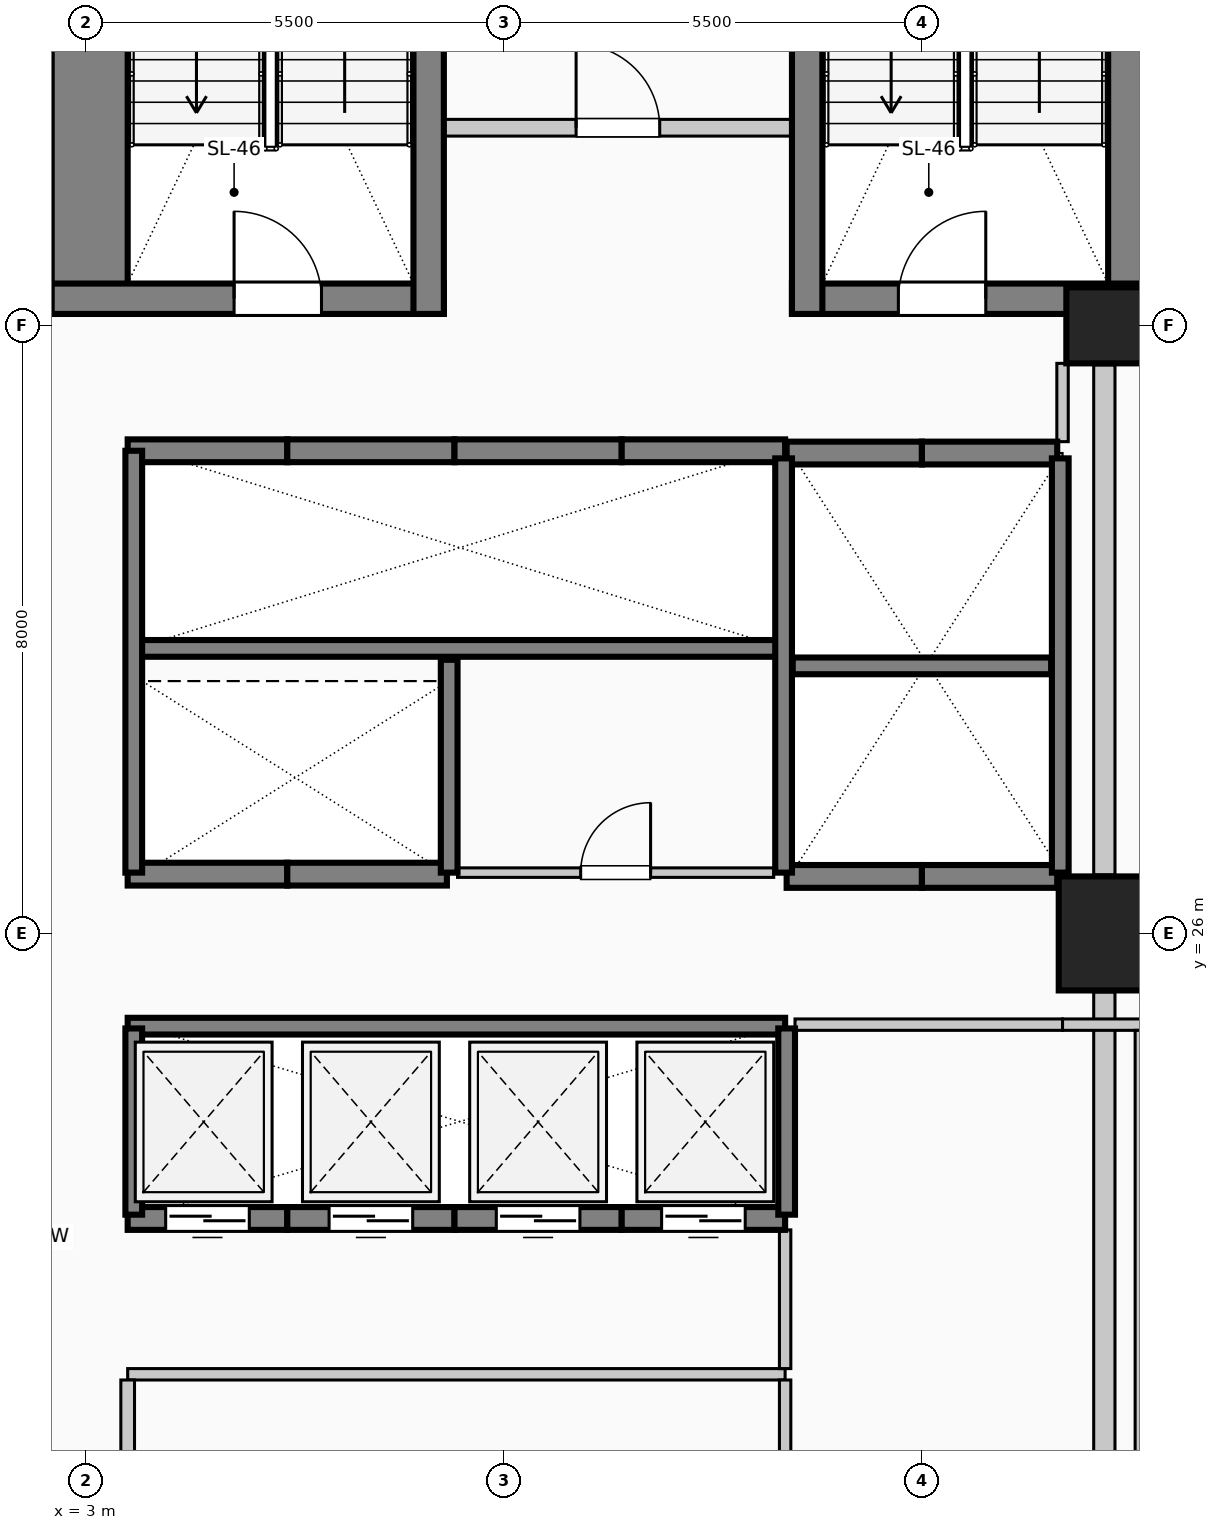
"""IFC4 building model, lengths in metres.
Left out: names, types, materials, properties, quantities, classifications, styles, units other than length and angle.
Written with IfcOpenShell. Run it as: python <this file> out.ifc"""

import sys

from ifc_helpers import new_model, si_unit, direction, frame, frame_2d, origin, origin_2d, place, context, subcontext, project, spatial, rectangle, circle, extrude, element, fill, save


model = new_model("IFC4")
c1 = context("Model", 3, precision=1e-05, world=origin(), true_north=direction((0.0, 1.0)))
c2 = subcontext(c1, "Body", "Model", "MODEL_VIEW")
j1 = project(units=[si_unit("LENGTHUNIT", "METRE"), si_unit("PLANEANGLEUNIT", "RADIAN")], contexts=[c1])
p1 = place(None, origin())
s1 = spatial("IfcSite", under=j1, at=p1, CompositionType="ELEMENT")
p2 = place(p1, origin())
s2 = spatial("IfcBuilding", under=s1, at=p2, CompositionType="ELEMENT")
p3 = place(p2, frame((0.0, 0.0, 26.6)))
s3 = spatial("IfcBuildingStorey", under=s2, at=p3, CompositionType="ELEMENT", Elevation=26.6)
for number, where, z_axis, x_axis in (
    (1, (3.05, 34.15, 0.0), (0.0, 0.0, 1.0), (0.0, 1.0, 0.0)),
    (2, (16.95, 34.15, 0.0), (0.0, 0.0, 1.0), (0.0, 1.0, 0.0)),
):
    element("IfcWall", number, at=place(p3, frame(where, z_axis=z_axis, x_axis=x_axis)), inside=s3, PredefinedType="SHEAR", context=c2, shape_type="SweptSolid", body=[
        extrude(rectangle(XDim=9.28, YDim=1.0, at=frame_2d((4.64, 0.0))), origin(), (0.0, 0.0, 1.0), 4.0),
    ])
p4 = place(p3, frame((2.55, 34.35, 0.0), z_axis=(0.0, 0.0, 1.0), x_axis=(1.0, 0.0, 0.0)))
e3 = element("IfcWall", 3, at=p4, inside=s3, PredefinedType="SHEAR", context=c2, shape_type="SweptSolid", body=[
    extrude(rectangle(XDim=5.16, YDim=0.4, at=frame_2d((2.58, 0.0))), origin(), (0.0, 0.0, 1.0), 4.0),
])
p5 = place(p4, frame((2.4, 0.0, 0.0)))
e4 = element("IfcOpeningElement", 4, at=p5, cuts=e3, PredefinedType="OPENING", context=c2, shape_type="SweptSolid", body=[
    extrude(rectangle(XDim=1.15, YDim=2.2, at=frame_2d((0.575, 1.1))), frame((0.0, 0.21, 0.0), z_axis=(0.0, -1.0, 0.0), x_axis=(1.0, 0.0, 0.0)), (0.0, 0.0, 1.0), 0.42),
])
p6 = place(p3, frame((12.29, 34.35, 0.0), z_axis=(0.0, 0.0, 1.0), x_axis=(1.0, 0.0, 0.0)))
e5 = element("IfcWall", 5, at=p6, inside=s3, PredefinedType="SHEAR", context=c2, shape_type="SweptSolid", body=[
    extrude(rectangle(XDim=5.16, YDim=0.4, at=frame_2d((2.58, 0.0))), origin(), (0.0, 0.0, 1.0), 4.0),
])
p7 = place(p6, frame((1.4, 0.0, 0.0)))
e6 = element("IfcOpeningElement", 6, at=p7, cuts=e5, PredefinedType="OPENING", context=c2, shape_type="SweptSolid", body=[
    extrude(rectangle(XDim=1.15, YDim=2.2, at=frame_2d((0.575, 1.1))), frame((0.0, 0.21, 0.0), z_axis=(0.0, -1.0, 0.0), x_axis=(1.0, 0.0, 0.0)), (0.0, 0.0, 1.0), 0.42),
])
for number, where, z_axis, x_axis in (
    (7, (7.51, 34.15, 0.0), (0.0, 0.0, 1.0), (0.0, 1.0, 0.0)),
    (8, (12.49, 34.15, 0.0), (0.0, 0.0, 1.0), (0.0, 1.0, 0.0)),
):
    element("IfcWall", number, at=place(p3, frame(where, z_axis=z_axis, x_axis=x_axis)), inside=s3, PredefinedType="SHEAR", context=c2, shape_type="SweptSolid", body=[
        extrude(rectangle(XDim=9.28, YDim=0.4, at=frame_2d((4.64, 0.0))), origin(), (0.0, 0.0, 1.0), 4.0),
    ])
p8 = place(p3, frame((16.4, 26.0, 0.0), z_axis=(0.0, 0.0, 1.0), x_axis=(1.0, 0.0, 0.0)))
e9 = element("IfcColumn", 9, at=p8, inside=s3, PredefinedType="COLUMN", context=c2, shape_type="SweptSolid", body=[
    extrude(rectangle(XDim=1.2, YDim=1.5, at=origin_2d()), origin(), (0.0, 0.0, 1.0), 4.0),
])
p9 = place(p3, frame((16.4, 34.0, 0.0), z_axis=(0.0, 0.0, 1.0), x_axis=(1.0, 0.0, 0.0)))
e10 = element("IfcColumn", 10, at=p9, inside=s3, PredefinedType="COLUMN", context=c2, shape_type="SweptSolid", body=[
    extrude(circle(Radius=0.5, at=origin_2d()), origin(), (0.0, 0.0, 1.0), 4.0),
])
p10 = place(p3, frame((16.4, 25.23, 0.0), z_axis=(0.0, 0.0, 1.0), x_axis=(0.0, -1.0, 0.0)))
e11 = element("IfcWall", 11, at=p10, inside=s3, PredefinedType="SOLIDWALL", context=c2, shape_type="SweptSolid", body=[
    extrude(rectangle(XDim=6.46, YDim=0.28, at=frame_2d((3.23, 0.0))), origin(), (0.0, 0.0, 1.0), 3.0),
])
p11 = place(p3, frame((16.4, 33.48, 0.0), z_axis=(0.0, 0.0, 1.0), x_axis=(0.0, -1.0, 0.0)))
e12 = element("IfcWall", 12, at=p11, inside=s3, PredefinedType="SOLIDWALL", context=c2, shape_type="SweptSolid", body=[
    extrude(rectangle(XDim=6.71, YDim=0.28, at=frame_2d((3.355, 0.0))), origin(), (0.0, 0.0, 1.0), 3.0),
])
p12 = place(p3, frame((5.65, 22.25, 0.0), z_axis=(0.0, 0.0, 1.0), x_axis=(-1.0, 0.0, 0.0)))
e13 = element("IfcWall", 13, at=p12, inside=s3, PredefinedType="SOLIDWALL", context=c2, shape_type="SweptSolid", body=[
    extrude(rectangle(XDim=2.1, YDim=0.3, at=frame_2d((1.05, 0.0))), origin(), (0.0, 0.0, 1.0), 4.0),
])
p13 = place(p12, frame((0.5, 0.0, 0.0)))
e14 = element("IfcOpeningElement", 14, at=p13, cuts=e13, PredefinedType="OPENING", context=c2, shape_type="SweptSolid", body=[
    extrude(rectangle(XDim=1.1, YDim=2.2, at=frame_2d((0.55, 1.1))), frame((0.0, 0.16, 0.0), z_axis=(0.0, -1.0, 0.0), x_axis=(1.0, 0.0, 0.0)), (0.0, 0.0, 1.0), 0.32),
])
p14 = place(p3, frame((7.85, 22.25, 0.0), z_axis=(0.0, 0.0, 1.0), x_axis=(-1.0, 0.0, 0.0)))
e15 = element("IfcWall", 15, at=p14, inside=s3, PredefinedType="SOLIDWALL", context=c2, shape_type="SweptSolid", body=[
    extrude(rectangle(XDim=2.2, YDim=0.3, at=frame_2d((1.1, 0.0))), origin(), (0.0, 0.0, 1.0), 4.0),
])
p15 = place(p14, frame((0.55, 0.0, 0.0)))
e16 = element("IfcOpeningElement", 16, at=p15, cuts=e15, PredefinedType="OPENING", context=c2, shape_type="SweptSolid", body=[
    extrude(rectangle(XDim=1.1, YDim=2.2, at=frame_2d((0.55, 1.1))), frame((0.0, 0.16, 0.0), z_axis=(0.0, -1.0, 0.0), x_axis=(1.0, 0.0, 0.0)), (0.0, 0.0, 1.0), 0.32),
])
p16 = place(p3, frame((10.05, 22.25, 0.0), z_axis=(0.0, 0.0, 1.0), x_axis=(-1.0, 0.0, 0.0)))
e17 = element("IfcWall", 17, at=p16, inside=s3, PredefinedType="SOLIDWALL", context=c2, shape_type="SweptSolid", body=[
    extrude(rectangle(XDim=2.2, YDim=0.3, at=frame_2d((1.1, 0.0))), origin(), (0.0, 0.0, 1.0), 4.0),
])
p17 = place(p16, frame((0.55, 0.0, 0.0)))
e18 = element("IfcOpeningElement", 18, at=p17, cuts=e17, PredefinedType="OPENING", context=c2, shape_type="SweptSolid", body=[
    extrude(rectangle(XDim=1.1, YDim=2.2, at=frame_2d((0.55, 1.1))), frame((0.0, 0.16, 0.0), z_axis=(0.0, -1.0, 0.0), x_axis=(1.0, 0.0, 0.0)), (0.0, 0.0, 1.0), 0.32),
])
p18 = place(p3, frame((12.2, 22.25, 0.0), z_axis=(0.0, 0.0, 1.0), x_axis=(-1.0, 0.0, 0.0)))
e19 = element("IfcWall", 19, at=p18, inside=s3, PredefinedType="SOLIDWALL", context=c2, shape_type="SweptSolid", body=[
    extrude(rectangle(XDim=2.15, YDim=0.3, at=frame_2d((1.075, 0.0))), origin(), (0.0, 0.0, 1.0), 4.0),
])
p19 = place(p18, frame((0.525, 0.0, 0.0)))
e20 = element("IfcOpeningElement", 20, at=p19, cuts=e19, PredefinedType="OPENING", context=c2, shape_type="SweptSolid", body=[
    extrude(rectangle(XDim=1.1, YDim=2.2, at=frame_2d((0.55, 1.1))), frame((0.0, 0.16, 0.0), z_axis=(0.0, -1.0, 0.0), x_axis=(1.0, 0.0, 0.0)), (0.0, 0.0, 1.0), 0.32),
])
for number, where, z_axis, x_axis in (
    (21, (14.0, 26.75, 0.0), (0.0, 0.0, 1.0), (-1.0, 0.0, 0.0)),
    (22, (15.78, 26.75, 0.0), (0.0, 0.0, 1.0), (-1.0, 0.0, 0.0)),
    (23, (12.22, 32.32, 0.0), (0.0, 0.0, 1.0), (1.0, 0.0, 0.0)),
    (24, (14.0, 32.32, 0.0), (0.0, 0.0, 1.0), (1.0, 0.0, 0.0)),
):
    element("IfcWall", number, at=place(p3, frame(where, z_axis=z_axis, x_axis=x_axis)), inside=s3, PredefinedType="SOLIDWALL", context=c2, shape_type="SweptSolid", body=[
        extrude(rectangle(XDim=1.78, YDim=0.3, at=frame_2d((0.89, 0.0))), origin(), (0.0, 0.0, 1.0), 4.0),
    ])
p20 = place(p3, frame((3.55, 32.35, 0.0), z_axis=(0.0, 0.0, 1.0), x_axis=(1.0, 0.0, 0.0)))
e25 = element("IfcWall", 25, at=p20, inside=s3, PredefinedType="SOLIDWALL", context=c2, shape_type="SweptSolid", body=[
    extrude(rectangle(XDim=2.1, YDim=0.3, at=frame_2d((1.05, 0.0))), origin(), (0.0, 0.0, 1.0), 4.0),
])
p21 = place(p3, frame((5.65, 32.35, 0.0), z_axis=(0.0, 0.0, 1.0), x_axis=(1.0, 0.0, 0.0)))
e26 = element("IfcWall", 26, at=p21, inside=s3, PredefinedType="SOLIDWALL", context=c2, shape_type="SweptSolid", body=[
    extrude(rectangle(XDim=2.2, YDim=0.3, at=frame_2d((1.1, 0.0))), origin(), (0.0, 0.0, 1.0), 4.0),
])
p22 = place(p3, frame((7.85, 32.35, 0.0), z_axis=(0.0, 0.0, 1.0), x_axis=(1.0, 0.0, 0.0)))
e27 = element("IfcWall", 27, at=p22, inside=s3, PredefinedType="SOLIDWALL", context=c2, shape_type="SweptSolid", body=[
    extrude(rectangle(XDim=2.2, YDim=0.3, at=frame_2d((1.1, 0.0))), origin(), (0.0, 0.0, 1.0), 4.0),
])
p23 = place(p3, frame((10.05, 32.35, 0.0), z_axis=(0.0, 0.0, 1.0), x_axis=(1.0, 0.0, 0.0)))
e28 = element("IfcWall", 28, at=p23, inside=s3, PredefinedType="SOLIDWALL", context=c2, shape_type="SweptSolid", body=[
    extrude(rectangle(XDim=2.15, YDim=0.3, at=frame_2d((1.075, 0.0))), origin(), (0.0, 0.0, 1.0), 4.0),
])
p24 = place(p3, frame((5.65, 26.78, 0.0), z_axis=(0.0, 0.0, 1.0), x_axis=(-1.0, 0.0, 0.0)))
e29 = element("IfcWall", 29, at=p24, inside=s3, PredefinedType="SOLIDWALL", context=c2, shape_type="SweptSolid", body=[
    extrude(rectangle(XDim=2.1, YDim=0.3, at=frame_2d((1.05, 0.0))), origin(), (0.0, 0.0, 1.0), 4.0),
])
p25 = place(p3, frame((7.75, 26.78, 0.0), z_axis=(0.0, 0.0, 1.0), x_axis=(-1.0, 0.0, 0.0)))
e30 = element("IfcWall", 30, at=p25, inside=s3, PredefinedType="SOLIDWALL", context=c2, shape_type="SweptSolid", body=[
    extrude(rectangle(XDim=2.1, YDim=0.3, at=frame_2d((1.05, 0.0))), origin(), (0.0, 0.0, 1.0), 4.0),
])
p26 = place(p3, frame((3.55, 29.75, 0.0), z_axis=(0.0, 0.0, 1.0), x_axis=(1.0, 0.0, 0.0)))
e31 = element("IfcWall", 31, at=p26, inside=s3, PredefinedType="SOLIDWALL", context=c2, shape_type="SweptSolid", body=[
    extrude(rectangle(XDim=8.65, YDim=0.22, at=frame_2d((4.325, 0.0))), origin(), (0.0, 0.0, 1.0), 4.0),
])
p27 = place(p3, frame((3.63, 26.8, 0.0), z_axis=(0.0, 0.0, 1.0), x_axis=(0.0, 1.0, 0.0)))
e32 = element("IfcWall", 32, at=p27, inside=s3, PredefinedType="SOLIDWALL", context=c2, shape_type="SweptSolid", body=[
    extrude(rectangle(XDim=5.55, YDim=0.22, at=frame_2d((2.775, 0.0))), origin(), (0.0, 0.0, 1.0), 4.0),
])
p28 = place(p3, frame((7.78, 26.8, 0.0), z_axis=(0.0, 0.0, 1.0), x_axis=(0.0, 1.0, 0.0)))
e33 = element("IfcWall", 33, at=p28, inside=s3, PredefinedType="SOLIDWALL", context=c2, shape_type="SweptSolid", body=[
    extrude(rectangle(XDim=2.8, YDim=0.22, at=frame_2d((1.4, 0.0))), origin(), (0.0, 0.0, 1.0), 4.0),
])
for number, where, z_axis, x_axis in (
    (34, (12.18, 26.8, 0.0), (0.0, 0.0, 1.0), (0.0, 1.0, 0.0)),
    (35, (15.82, 26.8, 0.0), (0.0, 0.0, 1.0), (0.0, 1.0, 0.0)),
):
    element("IfcWall", number, at=place(p3, frame(where, z_axis=z_axis, x_axis=x_axis)), inside=s3, PredefinedType="SOLIDWALL", context=c2, shape_type="SweptSolid", body=[
        extrude(rectangle(XDim=5.45, YDim=0.22, at=frame_2d((2.725, 0.0))), origin(), (0.0, 0.0, 1.0), 4.0),
    ])
p29 = place(p3, frame((12.3, 29.52, 0.0), z_axis=(0.0, 0.0, 1.0), x_axis=(1.0, 0.0, 0.0)))
e36 = element("IfcWall", 36, at=p29, inside=s3, PredefinedType="SOLIDWALL", context=c2, shape_type="SweptSolid", body=[
    extrude(rectangle(XDim=3.4, YDim=0.22, at=frame_2d((1.7, 0.0))), origin(), (0.0, 0.0, 1.0), 4.0),
])
p30 = place(p3, frame((3.55, 24.78, 0.0), z_axis=(0.0, 0.0, 1.0), x_axis=(1.0, 0.0, 0.0)))
e37 = element("IfcWall", 37, at=p30, inside=s3, PredefinedType="SOLIDWALL", context=c2, shape_type="SweptSolid", body=[
    extrude(rectangle(XDim=8.65, YDim=0.22, at=frame_2d((4.325, 0.0))), origin(), (0.0, 0.0, 1.0), 4.0),
])
for number, where, z_axis, x_axis in (
    (38, (3.63, 22.3, 0.0), (0.0, 0.0, 1.0), (0.0, 1.0, 0.0)),
    (39, (12.22, 22.3, 0.0), (0.0, 0.0, 1.0), (0.0, 1.0, 0.0)),
):
    element("IfcWall", number, at=place(p3, frame(where, z_axis=z_axis, x_axis=x_axis)), inside=s3, PredefinedType="SOLIDWALL", context=c2, shape_type="SweptSolid", body=[
        extrude(rectangle(XDim=2.45, YDim=0.22, at=frame_2d((1.225, 0.0))), origin(), (0.0, 0.0, 1.0), 4.0),
    ])
p31 = place(p3, frame((7.51, 36.6, 0.0), z_axis=(0.0, 0.0, 1.0), x_axis=(1.0, 0.0, 0.0)))
e40 = element("IfcWall", 40, at=p31, inside=s3, PredefinedType="PARTITIONING", context=c2, shape_type="SweptSolid", body=[
    extrude(rectangle(XDim=4.98, YDim=0.22, at=frame_2d((2.49, 0.0))), origin(), (0.0, 0.0, 1.0), 3.7),
])
p32 = place(p31, frame((1.94, 0.0, 0.0)))
e41 = element("IfcOpeningElement", 41, at=p32, cuts=e40, PredefinedType="OPENING", context=c2, shape_type="SweptSolid", body=[
    extrude(rectangle(XDim=1.1, YDim=2.2, at=frame_2d((0.55, 1.1))), frame((0.0, 0.12, 0.0), z_axis=(0.0, -1.0, 0.0), x_axis=(1.0, 0.0, 0.0)), (0.0, 0.0, 1.0), 0.24),
])
p33 = place(p3, frame((3.55, 20.2, 0.0), z_axis=(0.0, 0.0, 1.0), x_axis=(1.0, 0.0, 0.0)))
e42 = element("IfcWall", 42, at=p33, inside=s3, PredefinedType="PARTITIONING", context=c2, shape_type="SweptSolid", body=[
    extrude(rectangle(XDim=8.65, YDim=0.15, at=frame_2d((4.325, 0.0))), origin(), (0.0, 0.0, 1.0), 3.7),
])
p34 = place(p3, frame((12.33, 24.8, 0.0), z_axis=(0.0, 0.0, 1.0), x_axis=(1.0, 0.0, 0.0)))
e43 = element("IfcWall", 43, at=p34, inside=s3, PredefinedType="PARTITIONING", context=c2, shape_type="SweptSolid", body=[
    extrude(rectangle(XDim=3.52, YDim=0.15, at=frame_2d((1.76, 0.0))), origin(), (0.0, 0.0, 1.0), 3.7),
])
p35 = place(p3, frame((15.85, 24.8, 0.0), z_axis=(0.0, 0.0, 1.0), x_axis=(1.0, 0.0, 0.0)))
e44 = element("IfcWall", 44, at=p35, inside=s3, PredefinedType="PARTITIONING", context=c2, shape_type="SweptSolid", body=[
    extrude(rectangle(XDim=1.03, YDim=0.15, at=frame_2d((0.515, 0.0))), origin(), (0.0, 0.0, 1.0), 3.7),
])
p36 = place(p3, frame((7.89, 26.8, 0.0), z_axis=(0.0, 0.0, 1.0), x_axis=(1.0, 0.0, 0.0)))
e45 = element("IfcWall", 45, at=p36, inside=s3, PredefinedType="PARTITIONING", context=c2, shape_type="SweptSolid", body=[
    extrude(rectangle(XDim=4.16, YDim=0.125, at=frame_2d((2.08, 0.0))), origin(), (0.0, 0.0, 1.0), 3.7),
])
p37 = place(p36, frame((1.62, 0.0, 0.0)))
e46 = element("IfcOpeningElement", 46, at=p37, cuts=e45, PredefinedType="OPENING", context=c2, shape_type="SweptSolid", body=[
    extrude(rectangle(XDim=0.92, YDim=2.1, at=frame_2d((0.46, 1.05))), frame((0.0, 0.073, 0.0), z_axis=(0.0, -1.0, 0.0), x_axis=(1.0, 0.0, 0.0)), (0.0, 0.0, 1.0), 0.145),
])
p38 = place(p3, frame((3.55, 17.39, 0.0), z_axis=(0.0, 0.0, 1.0), x_axis=(0.0, 1.0, 0.0)))
e47 = element("IfcWall", 47, at=p38, inside=s3, PredefinedType="PARTITIONING", context=c2, shape_type="SweptSolid", body=[
    extrude(rectangle(XDim=2.735, YDim=0.18, at=frame_2d((1.368, 0.0))), origin(), (0.0, 0.0, 1.0), 3.7),
])
p39 = place(p3, frame((12.2, 17.39, 0.0), z_axis=(0.0, 0.0, 1.0), x_axis=(0.0, 1.0, 0.0)))
e48 = element("IfcWall", 48, at=p39, inside=s3, PredefinedType="PARTITIONING", context=c2, shape_type="SweptSolid", body=[
    extrude(rectangle(XDim=2.735, YDim=0.15, at=frame_2d((1.368, 0.0))), origin(), (0.0, 0.0, 1.0), 3.7),
])
p40 = place(p3, frame((12.2, 20.275, 0.0), z_axis=(0.0, 0.0, 1.0), x_axis=(0.0, 1.0, 0.0)))
e49 = element("IfcWall", 49, at=p40, inside=s3, PredefinedType="PARTITIONING", context=c2, shape_type="SweptSolid", body=[
    extrude(rectangle(XDim=1.825, YDim=0.15, at=frame_2d((0.913, 0.0))), origin(), (0.0, 0.0, 1.0), 3.7),
])
p41 = place(p3, frame((15.85, 32.47, 0.0), z_axis=(0.0, 0.0, 1.0), x_axis=(0.0, 1.0, 0.0)))
e50 = element("IfcWall", 50, at=p41, inside=s3, PredefinedType="PARTITIONING", context=c2, shape_type="SweptSolid", body=[
    extrude(rectangle(XDim=1.03, YDim=0.15, at=frame_2d((0.515, 0.0))), origin(), (0.0, 0.0, 1.0), 3.7),
])
p42 = place(p3, frame((16.88, 18.75, 0.0), z_axis=(0.0, 0.0, 1.0), x_axis=(0.0, 1.0, 0.0)))
e51 = element("IfcWall", 51, at=p42, inside=s3, PredefinedType="PARTITIONING", context=c2, shape_type="SweptSolid", body=[
    extrude(rectangle(XDim=5.975, YDim=0.15, at=frame_2d((2.988, 0.0))), origin(), (0.0, 0.0, 1.0), 3.7),
])
p43 = place(p13, origin())
e52 = element("IfcDoor", 52, at=p43, inside=s3, OperationType="SLIDING_TO_LEFT", PredefinedType="DOOR", context=c2, shape_type="SweptSolid", body=[
    extrude(rectangle(XDim=1.1, YDim=2.2, at=frame_2d((0.55, 1.1))), frame((0.0, 0.025, 0.0), z_axis=(0.0, -1.0, 0.0), x_axis=(1.0, 0.0, 0.0)), (0.0, 0.0, 1.0), 0.05),
])
fill(e14, e52)
p44 = place(p15, origin())
e53 = element("IfcDoor", 53, at=p44, inside=s3, OperationType="SLIDING_TO_RIGHT", PredefinedType="DOOR", context=c2, shape_type="SweptSolid", body=[
    extrude(rectangle(XDim=1.1, YDim=2.2, at=frame_2d((0.55, 1.1))), frame((0.0, 0.025, 0.0), z_axis=(0.0, -1.0, 0.0), x_axis=(1.0, 0.0, 0.0)), (0.0, 0.0, 1.0), 0.05),
])
fill(e16, e53)
p45 = place(p17, origin())
e54 = element("IfcDoor", 54, at=p45, inside=s3, OperationType="SLIDING_TO_LEFT", PredefinedType="DOOR", context=c2, shape_type="SweptSolid", body=[
    extrude(rectangle(XDim=1.1, YDim=2.2, at=frame_2d((0.55, 1.1))), frame((0.0, 0.025, 0.0), z_axis=(0.0, -1.0, 0.0), x_axis=(1.0, 0.0, 0.0)), (0.0, 0.0, 1.0), 0.05),
])
fill(e18, e54)
p46 = place(p19, origin())
e55 = element("IfcDoor", 55, at=p46, inside=s3, OperationType="SLIDING_TO_RIGHT", PredefinedType="DOOR", context=c2, shape_type="SweptSolid", body=[
    extrude(rectangle(XDim=1.1, YDim=2.2, at=frame_2d((0.55, 1.1))), frame((0.0, 0.025, 0.0), z_axis=(0.0, -1.0, 0.0), x_axis=(1.0, 0.0, 0.0)), (0.0, 0.0, 1.0), 0.05),
])
fill(e20, e55)
p47 = place(p5, origin())
e56 = element("IfcDoor", 56, at=p47, inside=s3, OperationType="SINGLE_SWING_LEFT", PredefinedType="DOOR", context=c2, shape_type="SweptSolid", body=[
    extrude(rectangle(XDim=1.15, YDim=2.2, at=frame_2d((0.575, 1.1))), frame((0.0, 0.025, 0.0), z_axis=(0.0, -1.0, 0.0), x_axis=(1.0, 0.0, 0.0)), (0.0, 0.0, 1.0), 0.05),
])
fill(e4, e56)
p48 = place(p7, origin())
e57 = element("IfcDoor", 57, at=p48, inside=s3, OperationType="SINGLE_SWING_RIGHT", PredefinedType="DOOR", context=c2, shape_type="SweptSolid", body=[
    extrude(rectangle(XDim=1.15, YDim=2.2, at=frame_2d((0.575, 1.1))), frame((0.0, 0.025, 0.0), z_axis=(0.0, -1.0, 0.0), x_axis=(1.0, 0.0, 0.0)), (0.0, 0.0, 1.0), 0.05),
])
fill(e6, e57)
p49 = place(p32, origin())
e58 = element("IfcDoor", 58, at=p49, inside=s3, OperationType="SINGLE_SWING_LEFT", PredefinedType="DOOR", context=c2, shape_type="SweptSolid", body=[
    extrude(rectangle(XDim=1.1, YDim=2.2, at=frame_2d((0.55, 1.1))), frame((0.0, 0.025, 0.0), z_axis=(0.0, -1.0, 0.0), x_axis=(1.0, 0.0, 0.0)), (0.0, 0.0, 1.0), 0.05),
])
fill(e41, e58)
p50 = place(p37, origin())
e59 = element("IfcDoor", 59, at=p50, inside=s3, OperationType="SINGLE_SWING_RIGHT", PredefinedType="DOOR", context=c2, shape_type="SweptSolid", body=[
    extrude(rectangle(XDim=0.92, YDim=2.1, at=frame_2d((0.46, 1.05))), frame((0.0, 0.025, 0.0), z_axis=(0.0, -1.0, 0.0), x_axis=(1.0, 0.0, 0.0)), (0.0, 0.0, 1.0), 0.05),
])
fill(e46, e59)
save(model, sys.argv[1])
